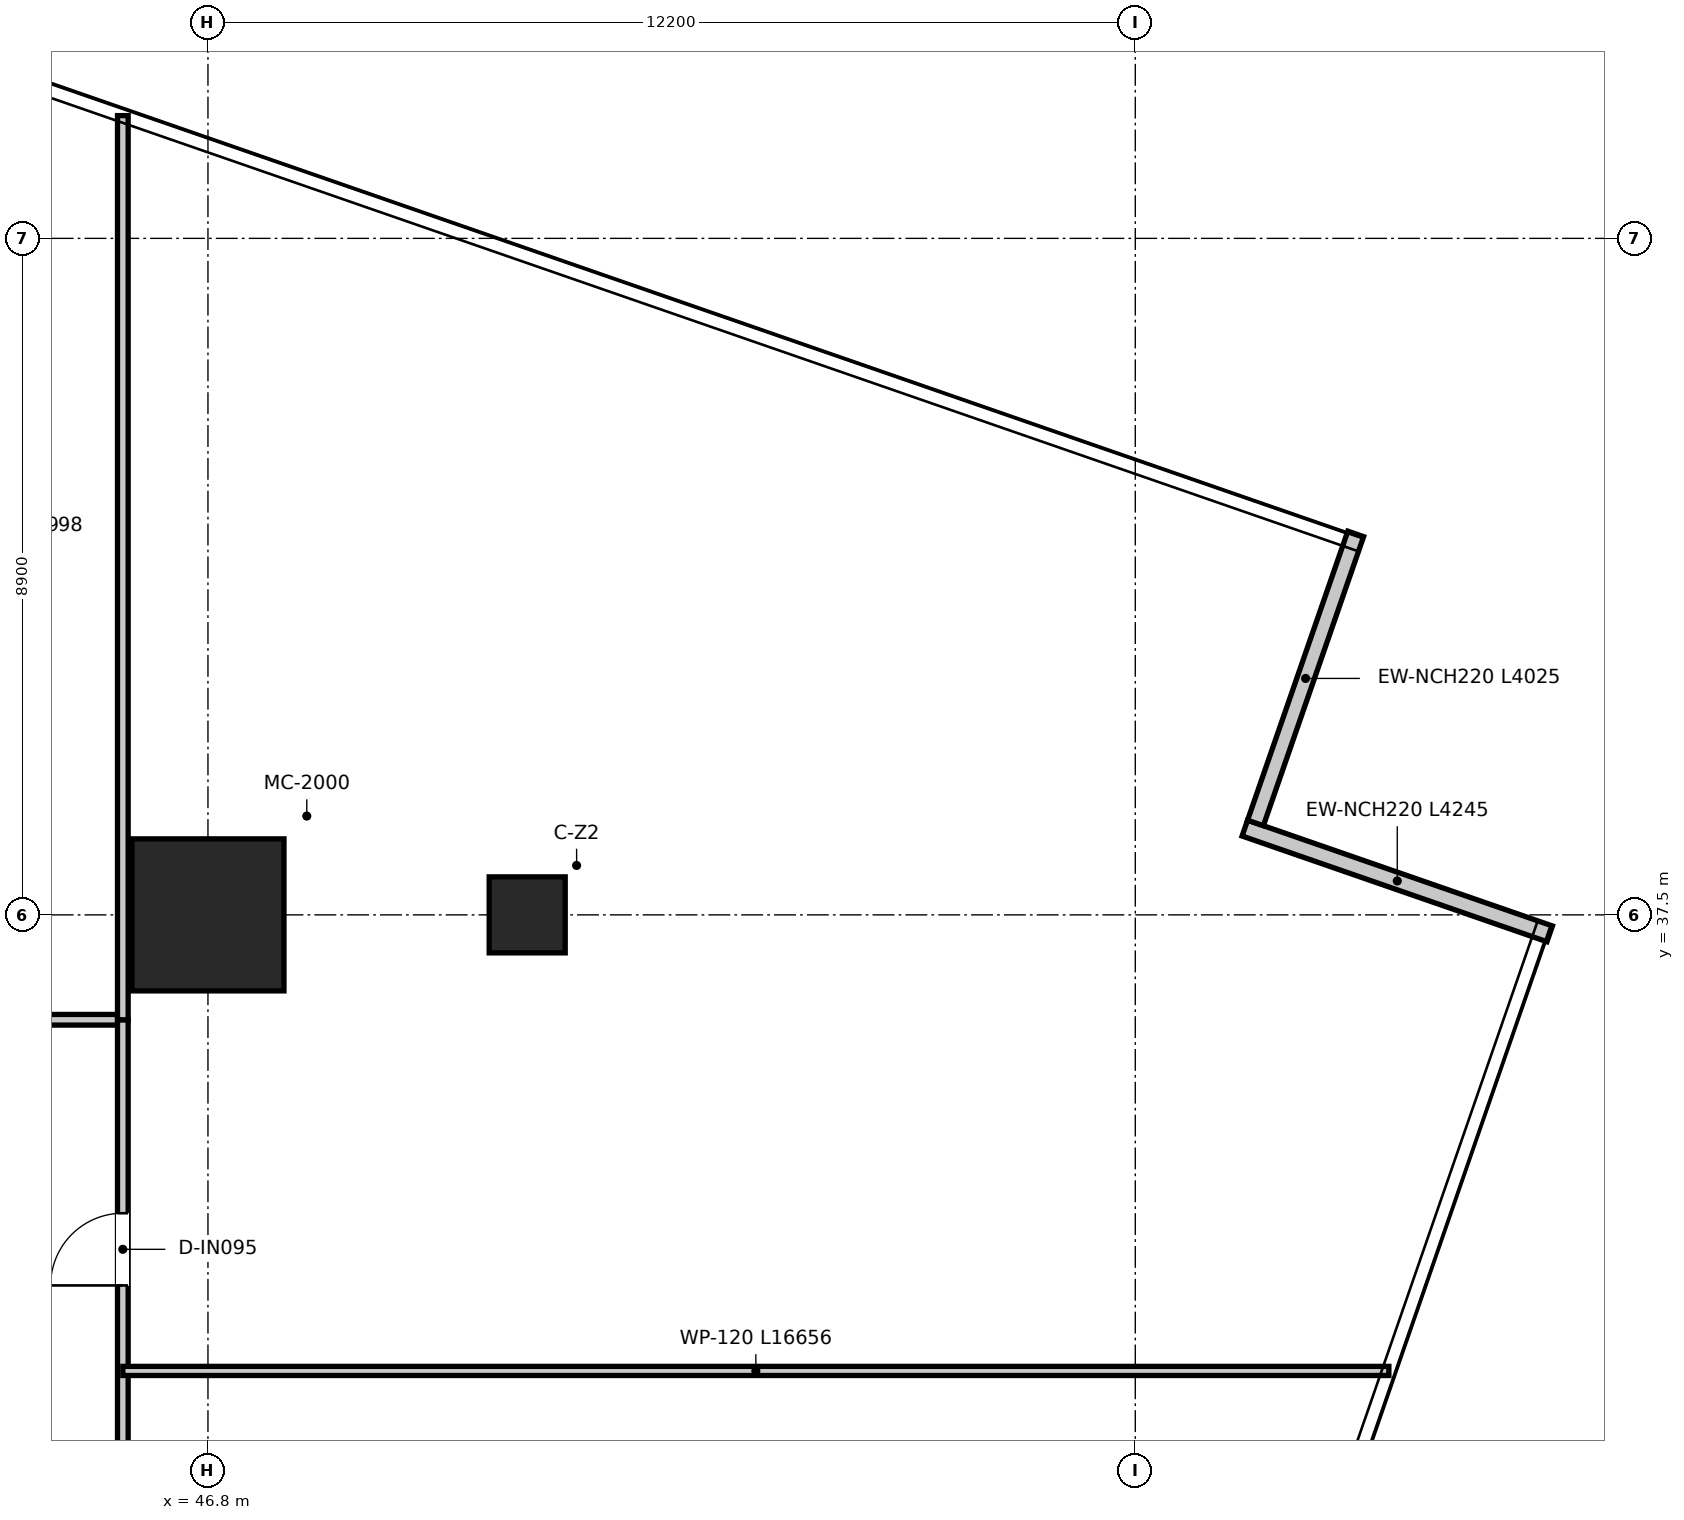
"""IFC4 building model, lengths in metres.
Left out: names, types, materials, properties, quantities, classifications, styles, units other than length and angle.
Written with IfcOpenShell. Run it as: python <this file> out.ifc"""

import sys

from ifc_helpers import new_model, si_unit, direction, frame, frame_2d, origin, origin_2d, place, context, subcontext, project, spatial, rectangle, extrude, source, transform, mapped, element, fill, save


model = new_model("IFC4")
c1 = context("Model", 3, precision=1e-05, world=origin(), true_north=direction((0.0, 1.0)))
c2 = subcontext(c1, "Body", "Model", "MODEL_VIEW")
j1 = project(units=[si_unit("LENGTHUNIT", "METRE"), si_unit("PLANEANGLEUNIT", "RADIAN")], contexts=[c1])
p1 = place(None, origin())
s1 = spatial("IfcSite", under=j1, at=p1, CompositionType="ELEMENT")
p2 = place(p1, origin())
s2 = spatial("IfcBuilding", under=s1, at=p2, CompositionType="ELEMENT")
p3 = place(p2, frame((0.0, 0.0, 117.7)))
s3 = spatial("IfcBuildingStorey", under=s2, at=p3, CompositionType="ELEMENT", Elevation=117.7)
m1 = source(origin(), c2, "Body", "SweptSolid", [
    extrude(rectangle(XDim=2.0, YDim=2.0, at=origin_2d()), origin(), (0.0, 0.0, 1.0), 3.95),
])
p4 = place(p3, frame((46.8, 37.5, 0.0), z_axis=(0.0, 0.0, 1.0), x_axis=(1.0, 0.0, 0.0)))
e1 = element("IfcColumn", 1, at=p4, inside=s3, PredefinedType="USERDEFINED", context=c2, shape_type="MappedRepresentation", body=[
    mapped(m1, transform((0.0, 0.0, 0.0), x_axis=(1.0, 0.0, 0.0), y_axis=(0.0, 1.0, 0.0), z_axis=(0.0, 0.0, 1.0), scale=1.0)),
])
m2 = source(origin(), c2, "Body", "SweptSolid", [
    extrude(rectangle(XDim=1.0, YDim=1.0, at=origin_2d()), origin(), (0.0, 0.0, 1.0), 3.95),
])
p5 = place(p3, frame((51.0, 37.5, 0.0), z_axis=(0.0, 0.0, 1.0), x_axis=(1.0, 0.0, 0.0)))
e2 = element("IfcColumn", 2, at=p5, inside=s3, PredefinedType="COLUMN", context=c2, shape_type="MappedRepresentation", body=[
    mapped(m2, transform((0.0, 0.0, 0.0), x_axis=(1.0, 0.0, 0.0), y_axis=(0.0, 1.0, 0.0), z_axis=(0.0, 0.0, 1.0), scale=1.0)),
])
p6 = place(p3, frame((64.452, 37.25, 0.0), z_axis=(0.0, 0.0, 1.0), x_axis=(-0.944801308279, 0.327643843028, 0.0)))
e3 = element("IfcWall", 3, at=p6, inside=s3, PredefinedType="ELEMENTEDWALL", context=c2, shape_type="SweptSolid", body=[
    extrude(rectangle(XDim=4.245, YDim=0.22, at=frame_2d((2.123, 0.0))), origin(), (0.0, 0.0, 1.0), 3.67),
])
p7 = place(p3, frame((60.581, 38.709, 0.0), z_axis=(0.0, 0.0, 1.0), x_axis=(0.327650062068, 0.94479915158, 0.0)))
e4 = element("IfcWall", 4, at=p7, inside=s3, PredefinedType="ELEMENTEDWALL", context=c2, shape_type="SweptSolid", body=[
    extrude(rectangle(XDim=4.025, YDim=0.22, at=frame_2d((2.013, 0.0))), origin(), (0.0, 0.0, 1.0), 3.67),
])
p8 = place(p3, frame((26.32, 36.12, 0.0), z_axis=(0.0, 0.0, 1.0), x_axis=(1.0, 0.0, 0.0)))
e5 = element("IfcWall", 5, at=p8, inside=s3, PredefinedType="PARTITIONING", context=c2, shape_type="SweptSolid", body=[
    extrude(rectangle(XDim=19.36, YDim=0.14, at=frame_2d((9.68, 0.0))), origin(), (0.0, 0.0, 1.0), 3.08),
])
p9 = place(p8, frame((1.615, 0.0, 0.0)))
e6 = element("IfcOpeningElement", 6, at=p9, cuts=e5, PredefinedType="OPENING", context=c2, shape_type="SweptSolid", body=[
    extrude(rectangle(XDim=0.95, YDim=2.1, at=frame_2d((0.475, 1.05))), frame((0.0, 0.08, 0.0), z_axis=(0.0, -1.0, 0.0), x_axis=(1.0, 0.0, 0.0)), (0.0, 0.0, 1.0), 0.16),
])
p10 = place(p8, frame((6.705, 0.0, 0.0)))
e7 = element("IfcOpeningElement", 7, at=p10, cuts=e5, PredefinedType="OPENING", context=c2, shape_type="SweptSolid", body=[
    extrude(rectangle(XDim=0.95, YDim=2.1, at=frame_2d((0.475, 1.05))), frame((0.0, 0.08, 0.0), z_axis=(0.0, -1.0, 0.0), x_axis=(1.0, 0.0, 0.0)), (0.0, 0.0, 1.0), 0.16),
])
p11 = place(p8, frame((12.705, 0.0, 0.0)))
e8 = element("IfcOpeningElement", 8, at=p11, cuts=e5, PredefinedType="OPENING", context=c2, shape_type="SweptSolid", body=[
    extrude(rectangle(XDim=0.95, YDim=2.1, at=frame_2d((0.475, 1.05))), frame((0.0, 0.08, 0.0), z_axis=(0.0, -1.0, 0.0), x_axis=(1.0, 0.0, 0.0)), (0.0, 0.0, 1.0), 0.16),
])
p12 = place(p8, frame((17.295, 0.0, 0.0)))
e9 = element("IfcOpeningElement", 9, at=p12, cuts=e5, PredefinedType="OPENING", context=c2, shape_type="SweptSolid", body=[
    extrude(rectangle(XDim=0.95, YDim=2.1, at=frame_2d((0.475, 1.05))), frame((0.0, 0.08, 0.0), z_axis=(0.0, -1.0, 0.0), x_axis=(1.0, 0.0, 0.0)), (0.0, 0.0, 1.0), 0.16),
])
p13 = place(p3, frame((45.68, 10.5, 0.0), z_axis=(0.0, 0.0, 1.0), x_axis=(0.0, 1.0, 0.0)))
e10 = element("IfcWall", 10, at=p13, inside=s3, PredefinedType="PARTITIONING", context=c2, shape_type="SweptSolid", body=[
    extrude(rectangle(XDim=25.62, YDim=0.14, at=frame_2d((12.81, 0.0))), origin(), (0.0, 0.0, 1.0), 2.97),
])
p14 = place(p13, frame((9.525, 0.0, 0.0)))
e11 = element("IfcOpeningElement", 11, at=p14, cuts=e10, PredefinedType="OPENING", context=c2, shape_type="SweptSolid", body=[
    extrude(rectangle(XDim=0.95, YDim=2.1, at=frame_2d((0.475, 1.05))), frame((0.0, 0.08, 0.0), z_axis=(0.0, -1.0, 0.0), x_axis=(1.0, 0.0, 0.0)), (0.0, 0.0, 1.0), 0.16),
])
p15 = place(p13, frame((16.525, 0.0, 0.0)))
e12 = element("IfcOpeningElement", 12, at=p15, cuts=e10, PredefinedType="OPENING", context=c2, shape_type="SweptSolid", body=[
    extrude(rectangle(XDim=0.95, YDim=2.1, at=frame_2d((0.475, 1.05))), frame((0.0, 0.08, 0.0), z_axis=(0.0, -1.0, 0.0), x_axis=(1.0, 0.0, 0.0)), (0.0, 0.0, 1.0), 0.16),
])
p16 = place(p13, frame((22.125, 0.0, 0.0)))
e13 = element("IfcOpeningElement", 13, at=p16, cuts=e10, PredefinedType="OPENING", context=c2, shape_type="SweptSolid", body=[
    extrude(rectangle(XDim=0.95, YDim=2.1, at=frame_2d((0.475, 1.05))), frame((0.0, 0.08, 0.0), z_axis=(0.0, -1.0, 0.0), x_axis=(1.0, 0.0, 0.0)), (0.0, 0.0, 1.0), 0.16),
])
p17 = place(p3, frame((45.68, 36.12, 0.0), z_axis=(0.0, 0.0, 1.0), x_axis=(0.0, 1.0, 0.0)))
e14 = element("IfcWall", 14, at=p17, inside=s3, PredefinedType="PARTITIONING", context=c2, shape_type="SweptSolid", body=[
    extrude(rectangle(XDim=11.895, YDim=0.14, at=frame_2d((5.947, 0.0))), origin(), (0.0, 0.0, 1.0), 2.97),
])
p18 = place(p3, frame((45.68, 31.5, 0.0), z_axis=(0.0, 0.0, 1.0), x_axis=(1.0, 0.0, 0.0)))
e15 = element("IfcWall", 15, at=p18, inside=s3, PredefinedType="PARTITIONING", context=c2, shape_type="SweptSolid", body=[
    extrude(rectangle(XDim=16.656, YDim=0.12, at=frame_2d((8.328, 0.0))), origin(), (0.0, 0.0, 1.0), 2.97),
])
p19 = place(p16, origin())
e16 = element("IfcDoor", 16, at=p19, inside=s3, OperationType="SINGLE_SWING_LEFT", PredefinedType="DOOR", context=c2, shape_type="SweptSolid", body=[
    extrude(rectangle(XDim=0.95, YDim=2.1, at=frame_2d((0.475, 1.05))), frame((0.0, 0.025, 0.0), z_axis=(0.0, -1.0, 0.0), x_axis=(1.0, 0.0, 0.0)), (0.0, 0.0, 1.0), 0.05),
])
fill(e13, e16)
save(model, sys.argv[1])
